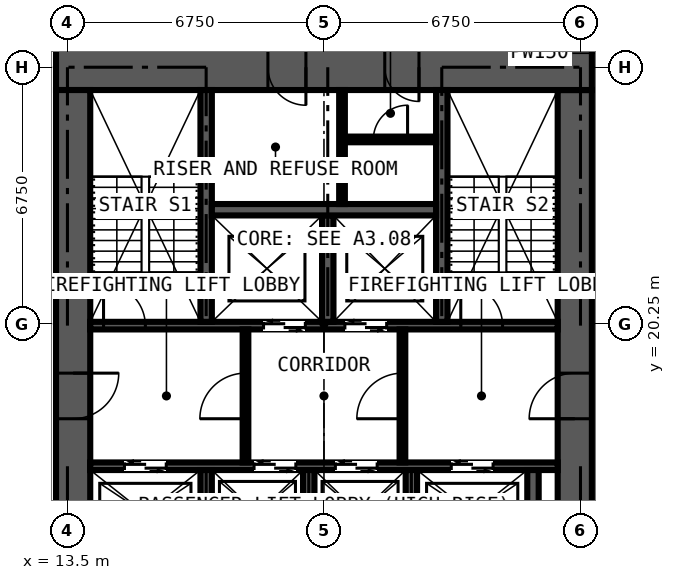
"""IFC4 building model, lengths in metres.
Left out: names, types, materials, properties, quantities, classifications, styles, units other than length and angle.
Written with IfcOpenShell. Run it as: python <this file> out.ifc"""

import sys

from ifc_helpers import new_model, si_unit, direction, frame, frame_2d, origin, place, context, subcontext, project, spatial, rectangle, extrude, element, fill, save


model = new_model("IFC4")
c1 = context("Model", 3, precision=1e-05, world=origin(), true_north=direction((0.0, 1.0)))
c2 = subcontext(c1, "Body", "Model", "MODEL_VIEW")
j1 = project(units=[si_unit("LENGTHUNIT", "METRE"), si_unit("PLANEANGLEUNIT", "RADIAN")], contexts=[c1])
p1 = place(None, origin())
s1 = spatial("IfcSite", under=j1, at=p1, CompositionType="ELEMENT")
p2 = place(p1, origin())
s2 = spatial("IfcBuilding", under=s1, at=p2, CompositionType="ELEMENT")
p3 = place(p2, frame((0.0, 0.0, 247.5)))
s3 = spatial("IfcBuildingStorey", under=s2, at=p3, CompositionType="ELEMENT", Elevation=247.5)
p4 = place(p3, frame((26.85, 14.1, 0.0), z_axis=(0.0, 0.0, 1.0), x_axis=(0.0, 1.0, 0.0)))
e1 = element("IfcWall", 1, at=p4, inside=s3, PredefinedType="SHEAR", context=c2, shape_type="SweptSolid", body=[
    extrude(rectangle(XDim=12.3, YDim=0.9, at=frame_2d((6.15, 0.0))), origin(), (0.0, 0.0, 1.0), 3.6),
])
p5 = place(p4, frame((3.65, 0.0, 0.0)))
e2 = element("IfcOpeningElement", 2, at=p5, cuts=e1, PredefinedType="OPENING", context=c2, shape_type="SweptSolid", body=[
    extrude(rectangle(XDim=1.2, YDim=2.2, at=frame_2d((0.6, 1.1))), frame((0.0, 0.46, 0.0), z_axis=(0.0, -1.0, 0.0), x_axis=(1.0, 0.0, 0.0)), (0.0, 0.0, 1.0), 0.92),
])
p6 = place(p3, frame((27.3, 27.0, 0.0), z_axis=(0.0, 0.0, 1.0), x_axis=(-1.0, 0.0, 0.0)))
e3 = element("IfcWall", 3, at=p6, inside=s3, PredefinedType="SHEAR", context=c2, shape_type="SweptSolid", body=[
    extrude(rectangle(XDim=14.1, YDim=1.2, at=frame_2d((7.05, 0.0))), origin(), (0.0, 0.0, 1.0), 3.6),
])
p7 = place(p6, frame((4.55, 0.0, 0.0)))
e4 = element("IfcOpeningElement", 4, at=p7, cuts=e3, PredefinedType="OPENING", context=c2, shape_type="SweptSolid", body=[
    extrude(rectangle(XDim=0.9, YDim=2.2, at=frame_2d((0.45, 1.1))), frame((0.0, 0.61, 0.0), z_axis=(0.0, -1.0, 0.0), x_axis=(1.0, 0.0, 0.0)), (0.0, 0.0, 1.0), 1.22),
])
p8 = place(p6, frame((7.525, 0.0, 0.0)))
e5 = element("IfcOpeningElement", 5, at=p8, cuts=e3, PredefinedType="OPENING", context=c2, shape_type="SweptSolid", body=[
    extrude(rectangle(XDim=1.0, YDim=2.2, at=frame_2d((0.5, 1.1))), frame((0.0, 0.61, 0.0), z_axis=(0.0, -1.0, 0.0), x_axis=(1.0, 0.0, 0.0)), (0.0, 0.0, 1.0), 1.22),
])
p9 = place(p3, frame((13.65, 26.4, 0.0), z_axis=(0.0, 0.0, 1.0), x_axis=(0.0, -1.0, 0.0)))
e6 = element("IfcWall", 6, at=p9, inside=s3, PredefinedType="SHEAR", context=c2, shape_type="SweptSolid", body=[
    extrude(rectangle(XDim=12.3, YDim=0.9, at=frame_2d((6.15, 0.0))), origin(), (0.0, 0.0, 1.0), 3.6),
])
p10 = place(p9, frame((7.45, 0.0, 0.0)))
e7 = element("IfcOpeningElement", 7, at=p10, cuts=e6, PredefinedType="OPENING", context=c2, shape_type="SweptSolid", body=[
    extrude(rectangle(XDim=1.2, YDim=2.2, at=frame_2d((0.6, 1.1))), frame((0.0, 0.46, 0.0), z_axis=(0.0, -1.0, 0.0), x_axis=(1.0, 0.0, 0.0)), (0.0, 0.0, 1.0), 0.92),
])
p11 = place(p3, frame((14.1, 16.5, 0.0), z_axis=(0.0, 0.0, 1.0), x_axis=(1.0, 0.0, 0.0)))
e8 = element("IfcWall", 8, at=p11, inside=s3, PredefinedType="SHEAR", context=c2, shape_type="SweptSolid", body=[
    extrude(rectangle(XDim=12.3, YDim=0.2, at=frame_2d((6.15, 0.0))), origin(), (0.0, 0.0, 1.0), 3.6),
])
p12 = place(p11, frame((0.9, 0.0, 0.0)))
e9 = element("IfcOpeningElement", 9, at=p12, cuts=e8, PredefinedType="OPENING", context=c2, shape_type="SweptSolid", body=[
    extrude(rectangle(XDim=1.1, YDim=2.2, at=frame_2d((0.55, 1.1))), frame((0.0, 0.11, 0.0), z_axis=(0.0, -1.0, 0.0), x_axis=(1.0, 0.0, 0.0)), (0.0, 0.0, 1.0), 0.22),
])
p13 = place(p11, frame((4.31, 0.0, 0.0)))
e10 = element("IfcOpeningElement", 10, at=p13, cuts=e8, PredefinedType="OPENING", context=c2, shape_type="SweptSolid", body=[
    extrude(rectangle(XDim=1.1, YDim=2.2, at=frame_2d((0.55, 1.1))), frame((0.0, 0.11, 0.0), z_axis=(0.0, -1.0, 0.0), x_axis=(1.0, 0.0, 0.0)), (0.0, 0.0, 1.0), 0.22),
])
p14 = place(p11, frame((6.45, 0.0, 0.0)))
e11 = element("IfcOpeningElement", 11, at=p14, cuts=e8, PredefinedType="OPENING", context=c2, shape_type="SweptSolid", body=[
    extrude(rectangle(XDim=1.1, YDim=2.2, at=frame_2d((0.55, 1.1))), frame((0.0, 0.11, 0.0), z_axis=(0.0, -1.0, 0.0), x_axis=(1.0, 0.0, 0.0)), (0.0, 0.0, 1.0), 0.22),
])
p15 = place(p11, frame((9.5, 0.0, 0.0)))
e12 = element("IfcOpeningElement", 12, at=p15, cuts=e8, PredefinedType="OPENING", context=c2, shape_type="SweptSolid", body=[
    extrude(rectangle(XDim=1.1, YDim=2.2, at=frame_2d((0.55, 1.1))), frame((0.0, 0.11, 0.0), z_axis=(0.0, -1.0, 0.0), x_axis=(1.0, 0.0, 0.0)), (0.0, 0.0, 1.0), 0.22),
])
p16 = place(p3, frame((14.1, 20.2, 0.0), z_axis=(0.0, 0.0, 1.0), x_axis=(1.0, 0.0, 0.0)))
e13 = element("IfcWall", 13, at=p16, inside=s3, PredefinedType="SHEAR", context=c2, shape_type="SweptSolid", body=[
    extrude(rectangle(XDim=12.3, YDim=0.2, at=frame_2d((6.15, 0.0))), origin(), (0.0, 0.0, 1.0), 3.6),
])
p17 = place(p16, frame((4.56, 0.0, 0.0)))
e14 = element("IfcOpeningElement", 14, at=p17, cuts=e13, PredefinedType="OPENING", context=c2, shape_type="SweptSolid", body=[
    extrude(rectangle(XDim=1.1, YDim=2.2, at=frame_2d((0.55, 1.1))), frame((0.0, 0.11, 0.0), z_axis=(0.0, -1.0, 0.0), x_axis=(1.0, 0.0, 0.0)), (0.0, 0.0, 1.0), 0.22),
])
p18 = place(p16, frame((6.7, 0.0, 0.0)))
e15 = element("IfcOpeningElement", 15, at=p18, cuts=e13, PredefinedType="OPENING", context=c2, shape_type="SweptSolid", body=[
    extrude(rectangle(XDim=1.1, YDim=2.2, at=frame_2d((0.55, 1.1))), frame((0.0, 0.11, 0.0), z_axis=(0.0, -1.0, 0.0), x_axis=(1.0, 0.0, 0.0)), (0.0, 0.0, 1.0), 0.22),
])
p19 = place(p16, frame((0.35, 0.0, 0.0)))
e16 = element("IfcOpeningElement", 16, at=p19, cuts=e13, PredefinedType="OPENING", context=c2, shape_type="SweptSolid", body=[
    extrude(rectangle(XDim=1.1, YDim=2.2, at=frame_2d((0.55, 1.1))), frame((0.0, 0.11, 0.0), z_axis=(0.0, -1.0, 0.0), x_axis=(1.0, 0.0, 0.0)), (0.0, 0.0, 1.0), 0.22),
])
p20 = place(p16, frame((9.75, 0.0, 0.0)))
e17 = element("IfcOpeningElement", 17, at=p20, cuts=e13, PredefinedType="OPENING", context=c2, shape_type="SweptSolid", body=[
    extrude(rectangle(XDim=1.1, YDim=2.2, at=frame_2d((0.55, 1.1))), frame((0.0, 0.11, 0.0), z_axis=(0.0, -1.0, 0.0), x_axis=(1.0, 0.0, 0.0)), (0.0, 0.0, 1.0), 0.22),
])
for number, where, z_axis, x_axis in (
    (18, (17.15, 20.3, 0.0), (0.0, 0.0, 1.0), (0.0, 1.0, 0.0)),
    (19, (23.35, 20.3, 0.0), (0.0, 0.0, 1.0), (0.0, 1.0, 0.0)),
):
    element("IfcWall", number, at=place(p3, frame(where, z_axis=z_axis, x_axis=x_axis)), inside=s3, PredefinedType="SHEAR", context=c2, shape_type="SweptSolid", body=[
        extrude(rectangle(XDim=6.1, YDim=0.3, at=frame_2d((3.05, 0.0))), origin(), (0.0, 0.0, 1.0), 3.6),
    ])
p21 = place(p3, frame((20.35, 20.3, 0.0), z_axis=(0.0, 0.0, 1.0), x_axis=(0.0, 1.0, 0.0)))
e20 = element("IfcWall", 20, at=p21, inside=s3, PredefinedType="SHEAR", context=c2, shape_type="SweptSolid", body=[
    extrude(rectangle(XDim=2.8, YDim=0.3, at=frame_2d((1.4, 0.0))), origin(), (0.0, 0.0, 1.0), 3.6),
])
p22 = place(p3, frame((17.3, 23.25, 0.0), z_axis=(0.0, 0.0, 1.0), x_axis=(1.0, 0.0, 0.0)))
e21 = element("IfcWall", 21, at=p22, inside=s3, PredefinedType="SHEAR", context=c2, shape_type="SweptSolid", body=[
    extrude(rectangle(XDim=5.9, YDim=0.3, at=frame_2d((2.95, 0.0))), origin(), (0.0, 0.0, 1.0), 3.6),
])
for number, where, z_axis, x_axis in (
    (22, (17.15, 14.1, 0.0), (0.0, 0.0, 1.0), (0.0, 1.0, 0.0)),
    (23, (19.85, 14.1, 0.0), (0.0, 0.0, 1.0), (0.0, 1.0, 0.0)),
    (24, (22.55, 14.1, 0.0), (0.0, 0.0, 1.0), (0.0, 1.0, 0.0)),
    (25, (25.75, 14.1, 0.0), (0.0, 0.0, 1.0), (0.0, 1.0, 0.0)),
):
    element("IfcWall", number, at=place(p3, frame(where, z_axis=z_axis, x_axis=x_axis)), inside=s3, PredefinedType="SHEAR", context=c2, shape_type="SweptSolid", body=[
        extrude(rectangle(XDim=2.3, YDim=0.3, at=frame_2d((1.15, 0.0))), origin(), (0.0, 0.0, 1.0), 3.6),
    ])
p23 = place(p3, frame((18.185, 16.6, 0.0), z_axis=(0.0, 0.0, 1.0), x_axis=(0.0, 1.0, 0.0)))
e26 = element("IfcWall", 26, at=p23, inside=s3, PredefinedType="PARTITIONING", context=c2, shape_type="SweptSolid", body=[
    extrude(rectangle(XDim=3.5, YDim=0.15, at=frame_2d((1.75, 0.0))), origin(), (0.0, 0.0, 1.0), 3.375),
])
p24 = place(p23, frame((1.15, 0.0, 0.0)))
e27 = element("IfcOpeningElement", 27, at=p24, cuts=e26, PredefinedType="OPENING", context=c2, shape_type="SweptSolid", body=[
    extrude(rectangle(XDim=1.2, YDim=2.2, at=frame_2d((0.6, 1.1))), frame((0.0, 0.085, 0.0), z_axis=(0.0, -1.0, 0.0), x_axis=(1.0, 0.0, 0.0)), (0.0, 0.0, 1.0), 0.17),
])
p25 = place(p3, frame((22.315, 16.6, 0.0), z_axis=(0.0, 0.0, 1.0), x_axis=(0.0, 1.0, 0.0)))
e28 = element("IfcWall", 28, at=p25, inside=s3, PredefinedType="PARTITIONING", context=c2, shape_type="SweptSolid", body=[
    extrude(rectangle(XDim=3.5, YDim=0.15, at=frame_2d((1.75, 0.0))), origin(), (0.0, 0.0, 1.0), 3.375),
])
p26 = place(p25, frame((1.15, 0.0, 0.0)))
e29 = element("IfcOpeningElement", 29, at=p26, cuts=e28, PredefinedType="OPENING", context=c2, shape_type="SweptSolid", body=[
    extrude(rectangle(XDim=1.2, YDim=2.2, at=frame_2d((0.6, 1.1))), frame((0.0, 0.085, 0.0), z_axis=(0.0, -1.0, 0.0), x_axis=(1.0, 0.0, 0.0)), (0.0, 0.0, 1.0), 0.17),
])
p27 = place(p3, frame((20.725, 23.4, 0.0), z_axis=(0.0, 0.0, 1.0), x_axis=(0.0, 1.0, 0.0)))
e30 = element("IfcWall", 30, at=p27, inside=s3, PredefinedType="PARTITIONING", context=c2, shape_type="SweptSolid", body=[
    extrude(rectangle(XDim=3.0, YDim=0.15, at=frame_2d((1.5, 0.0))), origin(), (0.0, 0.0, 1.0), 3.375),
])
p28 = place(p3, frame((20.8, 25.1, 0.0), z_axis=(0.0, 0.0, 1.0), x_axis=(1.0, 0.0, 0.0)))
e31 = element("IfcWall", 31, at=p28, inside=s3, PredefinedType="PARTITIONING", context=c2, shape_type="SweptSolid", body=[
    extrude(rectangle(XDim=2.4, YDim=0.15, at=frame_2d((1.2, 0.0))), origin(), (0.0, 0.0, 1.0), 3.375),
])
p29 = place(p28, frame((0.75, 0.0, 0.0)))
e32 = element("IfcOpeningElement", 32, at=p29, cuts=e31, PredefinedType="OPENING", context=c2, shape_type="SweptSolid", body=[
    extrude(rectangle(XDim=0.9, YDim=2.2, at=frame_2d((0.45, 1.1))), frame((0.0, 0.085, 0.0), z_axis=(0.0, -1.0, 0.0), x_axis=(1.0, 0.0, 0.0)), (0.0, 0.0, 1.0), 0.17),
])
p30 = place(p12, origin())
e33 = element("IfcDoor", 33, at=p30, inside=s3, OperationType="DOUBLE_DOOR_SLIDING", PredefinedType="DOOR", context=c2, shape_type="SweptSolid", body=[
    extrude(rectangle(XDim=1.1, YDim=2.2, at=frame_2d((0.55, 1.1))), frame((0.0, 0.025, 0.0), z_axis=(0.0, -1.0, 0.0), x_axis=(1.0, 0.0, 0.0)), (0.0, 0.0, 1.0), 0.05),
])
fill(e9, e33)
p31 = place(p13, origin())
e34 = element("IfcDoor", 34, at=p31, inside=s3, OperationType="DOUBLE_DOOR_SLIDING", PredefinedType="DOOR", context=c2, shape_type="SweptSolid", body=[
    extrude(rectangle(XDim=1.1, YDim=2.2, at=frame_2d((0.55, 1.1))), frame((0.0, 0.025, 0.0), z_axis=(0.0, -1.0, 0.0), x_axis=(1.0, 0.0, 0.0)), (0.0, 0.0, 1.0), 0.05),
])
fill(e10, e34)
p32 = place(p14, origin())
e35 = element("IfcDoor", 35, at=p32, inside=s3, OperationType="DOUBLE_DOOR_SLIDING", PredefinedType="DOOR", context=c2, shape_type="SweptSolid", body=[
    extrude(rectangle(XDim=1.1, YDim=2.2, at=frame_2d((0.55, 1.1))), frame((0.0, 0.025, 0.0), z_axis=(0.0, -1.0, 0.0), x_axis=(1.0, 0.0, 0.0)), (0.0, 0.0, 1.0), 0.05),
])
fill(e11, e35)
p33 = place(p15, origin())
e36 = element("IfcDoor", 36, at=p33, inside=s3, OperationType="DOUBLE_DOOR_SLIDING", PredefinedType="DOOR", context=c2, shape_type="SweptSolid", body=[
    extrude(rectangle(XDim=1.1, YDim=2.2, at=frame_2d((0.55, 1.1))), frame((0.0, 0.025, 0.0), z_axis=(0.0, -1.0, 0.0), x_axis=(1.0, 0.0, 0.0)), (0.0, 0.0, 1.0), 0.05),
])
fill(e12, e36)
p34 = place(p17, origin())
e37 = element("IfcDoor", 37, at=p34, inside=s3, OperationType="DOUBLE_DOOR_SLIDING", PredefinedType="DOOR", context=c2, shape_type="SweptSolid", body=[
    extrude(rectangle(XDim=1.1, YDim=2.2, at=frame_2d((0.55, 1.1))), frame((0.0, 0.025, 0.0), z_axis=(0.0, -1.0, 0.0), x_axis=(1.0, 0.0, 0.0)), (0.0, 0.0, 1.0), 0.05),
])
fill(e14, e37)
p35 = place(p18, origin())
e38 = element("IfcDoor", 38, at=p35, inside=s3, OperationType="DOUBLE_DOOR_SLIDING", PredefinedType="DOOR", context=c2, shape_type="SweptSolid", body=[
    extrude(rectangle(XDim=1.1, YDim=2.2, at=frame_2d((0.55, 1.1))), frame((0.0, 0.025, 0.0), z_axis=(0.0, -1.0, 0.0), x_axis=(1.0, 0.0, 0.0)), (0.0, 0.0, 1.0), 0.05),
])
fill(e15, e38)
p36 = place(p10, origin())
e39 = element("IfcDoor", 39, at=p36, inside=s3, OperationType="DOUBLE_DOOR_SINGLE_SWING", PredefinedType="DOOR", context=c2, shape_type="SweptSolid", body=[
    extrude(rectangle(XDim=1.2, YDim=2.2, at=frame_2d((0.6, 1.1))), frame((0.0, 0.025, 0.0), z_axis=(0.0, -1.0, 0.0), x_axis=(1.0, 0.0, 0.0)), (0.0, 0.0, 1.0), 0.05),
])
fill(e7, e39)
p37 = place(p5, origin())
e40 = element("IfcDoor", 40, at=p37, inside=s3, OperationType="DOUBLE_DOOR_SINGLE_SWING", PredefinedType="DOOR", context=c2, shape_type="SweptSolid", body=[
    extrude(rectangle(XDim=1.2, YDim=2.2, at=frame_2d((0.6, 1.1))), frame((0.0, 0.025, 0.0), z_axis=(0.0, -1.0, 0.0), x_axis=(1.0, 0.0, 0.0)), (0.0, 0.0, 1.0), 0.05),
])
fill(e2, e40)
p38 = place(p24, origin())
e41 = element("IfcDoor", 41, at=p38, inside=s3, OperationType="DOUBLE_DOOR_SINGLE_SWING", PredefinedType="DOOR", context=c2, shape_type="SweptSolid", body=[
    extrude(rectangle(XDim=1.2, YDim=2.2, at=frame_2d((0.6, 1.1))), frame((0.0, 0.025, 0.0), z_axis=(0.0, -1.0, 0.0), x_axis=(1.0, 0.0, 0.0)), (0.0, 0.0, 1.0), 0.05),
])
fill(e27, e41)
p39 = place(p26, origin())
e42 = element("IfcDoor", 42, at=p39, inside=s3, OperationType="DOUBLE_DOOR_SINGLE_SWING", PredefinedType="DOOR", context=c2, shape_type="SweptSolid", body=[
    extrude(rectangle(XDim=1.2, YDim=2.2, at=frame_2d((0.6, 1.1))), frame((0.0, 0.025, 0.0), z_axis=(0.0, -1.0, 0.0), x_axis=(1.0, 0.0, 0.0)), (0.0, 0.0, 1.0), 0.05),
])
fill(e29, e42)
p40 = place(p29, origin())
e43 = element("IfcDoor", 43, at=p40, inside=s3, OperationType="SINGLE_SWING_RIGHT", PredefinedType="DOOR", context=c2, shape_type="SweptSolid", body=[
    extrude(rectangle(XDim=0.9, YDim=2.2, at=frame_2d((0.45, 1.1))), frame((0.0, 0.025, 0.0), z_axis=(0.0, -1.0, 0.0), x_axis=(1.0, 0.0, 0.0)), (0.0, 0.0, 1.0), 0.05),
])
fill(e32, e43)
p41 = place(p7, origin())
e44 = element("IfcDoor", 44, at=p41, inside=s3, OperationType="SINGLE_SWING_LEFT", PredefinedType="DOOR", context=c2, shape_type="SweptSolid", body=[
    extrude(rectangle(XDim=0.9, YDim=2.2, at=frame_2d((0.45, 1.1))), frame((0.0, 0.4, 0.0), z_axis=(0.0, -1.0, 0.0), x_axis=(1.0, 0.0, 0.0)), (0.0, 0.0, 1.0), 0.8),
])
fill(e4, e44)
p42 = place(p8, origin())
e45 = element("IfcDoor", 45, at=p42, inside=s3, OperationType="SINGLE_SWING_LEFT", PredefinedType="DOOR", context=c2, shape_type="SweptSolid", body=[
    extrude(rectangle(XDim=1.0, YDim=2.2, at=frame_2d((0.5, 1.1))), frame((0.0, 0.025, 0.0), z_axis=(0.0, -1.0, 0.0), x_axis=(1.0, 0.0, 0.0)), (0.0, 0.0, 1.0), 0.05),
])
fill(e5, e45)
p43 = place(p19, origin())
e46 = element("IfcDoor", 46, at=p43, inside=s3, OperationType="SINGLE_SWING_LEFT", PredefinedType="DOOR", context=c2, shape_type="SweptSolid", body=[
    extrude(rectangle(XDim=1.1, YDim=2.2, at=frame_2d((0.55, 1.1))), frame((0.0, 0.025, 0.0), z_axis=(0.0, -1.0, 0.0), x_axis=(1.0, 0.0, 0.0)), (0.0, 0.0, 1.0), 0.05),
])
fill(e16, e46)
p44 = place(p20, origin())
e47 = element("IfcDoor", 47, at=p44, inside=s3, OperationType="SINGLE_SWING_LEFT", PredefinedType="DOOR", context=c2, shape_type="SweptSolid", body=[
    extrude(rectangle(XDim=1.1, YDim=2.2, at=frame_2d((0.55, 1.1))), frame((0.0, 0.025, 0.0), z_axis=(0.0, -1.0, 0.0), x_axis=(1.0, 0.0, 0.0)), (0.0, 0.0, 1.0), 0.05),
])
fill(e17, e47)
save(model, sys.argv[1])
